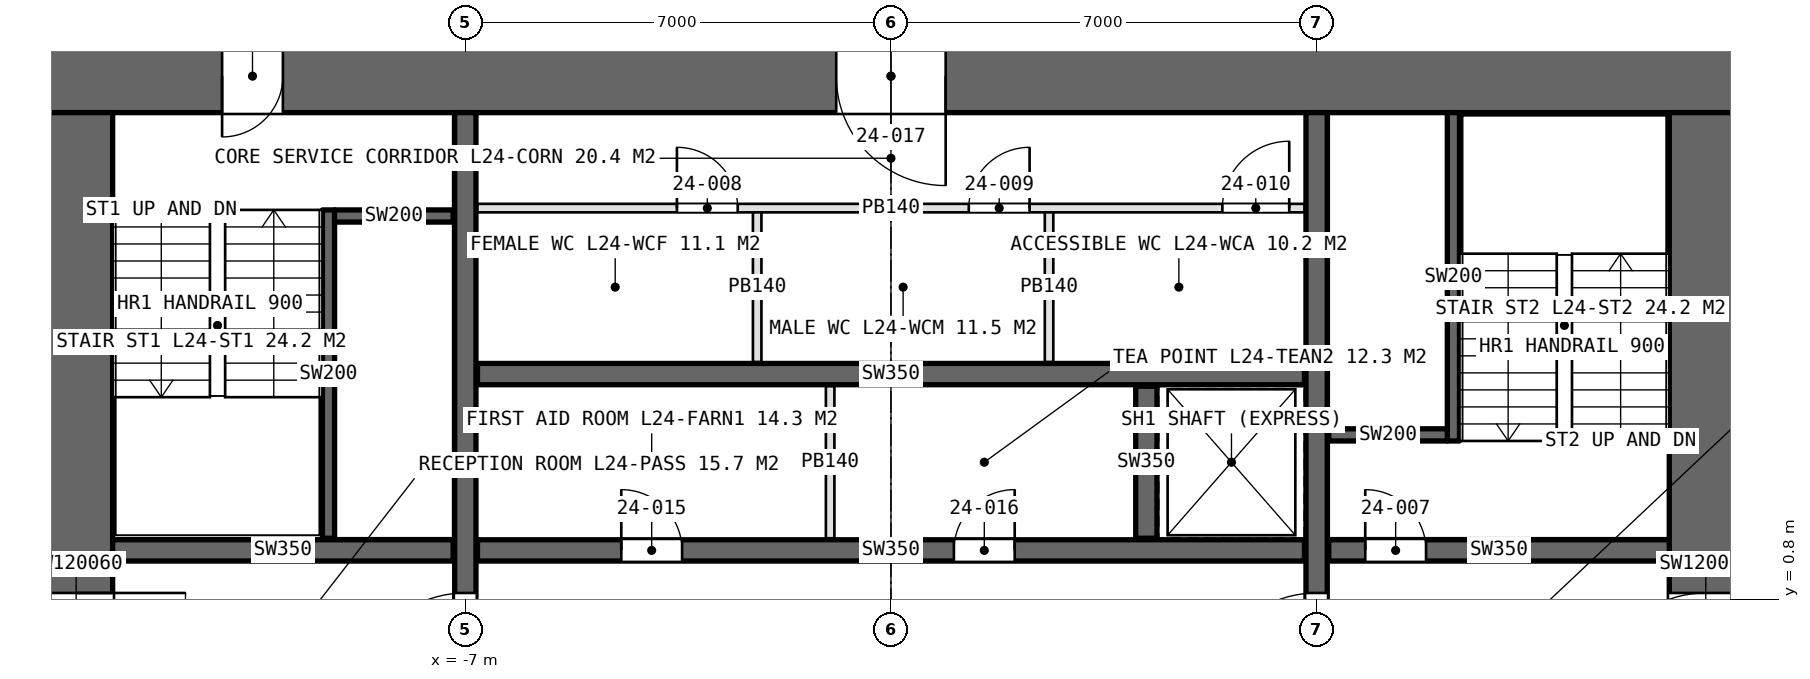
"""IFC4 building model, lengths in metres.
Left out: names, types, materials, properties, quantities, classifications, styles, units other than length and angle.
Written with IfcOpenShell. Run it as: python <this file> out.ifc"""

import sys

from ifc_helpers import new_model, si_unit, direction, frame, frame_2d, origin, place, context, subcontext, project, spatial, rectangle, extrude, element, fill, save


model = new_model("IFC4")
c1 = context("Model", 3, precision=1e-05, world=origin(), true_north=direction((0.0, 1.0)))
c2 = subcontext(c1, "Body", "Model", "MODEL_VIEW")
j1 = project(units=[si_unit("LENGTHUNIT", "METRE"), si_unit("PLANEANGLEUNIT", "RADIAN")], contexts=[c1])
p1 = place(None, origin())
s1 = spatial("IfcSite", under=j1, at=p1, CompositionType="ELEMENT")
p2 = place(p1, origin())
s2 = spatial("IfcBuilding", under=s1, at=p2, CompositionType="ELEMENT")
p3 = place(p2, frame((0.0, 0.0, 117.6)))
s3 = spatial("IfcBuildingStorey", under=s2, at=p3, CompositionType="ELEMENT", Elevation=117.6)
p4 = place(p3, frame((14.0, 9.4, 0.0), z_axis=(0.0, 0.0, 1.0), x_axis=(-1.0, 0.0, 0.0)))
e1 = element("IfcWall", 1, at=p4, inside=s3, PredefinedType="SHEAR", context=c2, shape_type="SweptSolid", body=[
    extrude(rectangle(XDim=28.0, YDim=1.2, at=frame_2d((14.0, 0.0))), origin(), (0.0, 0.0, 1.0), 4.2),
])
p5 = place(p4, frame((24.0, 0.0, 0.0)))
e2 = element("IfcOpeningElement", 2, at=p5, cuts=e1, PredefinedType="OPENING", context=c2, shape_type="SweptSolid", body=[
    extrude(rectangle(XDim=1.0, YDim=2.4, at=frame_2d((0.5, 1.2))), frame((0.0, 0.61, 0.0), z_axis=(0.0, -1.0, 0.0), x_axis=(1.0, 0.0, 0.0)), (0.0, 0.0, 1.0), 1.22),
])
p6 = place(p4, frame((13.1, 0.0, 0.0)))
e3 = element("IfcOpeningElement", 3, at=p6, cuts=e1, PredefinedType="OPENING", context=c2, shape_type="SweptSolid", body=[
    extrude(rectangle(XDim=1.8, YDim=2.4, at=frame_2d((0.9, 1.2))), frame((0.0, 0.61, 0.0), z_axis=(0.0, -1.0, 0.0), x_axis=(1.0, 0.0, 0.0)), (0.0, 0.0, 1.0), 1.22),
])
p7 = place(p3, frame((-13.4, 8.8, 0.0), z_axis=(0.0, 0.0, 1.0), x_axis=(0.0, -1.0, 0.0)))
e4 = element("IfcWall", 4, at=p7, inside=s3, PredefinedType="SHEAR", context=c2, shape_type="SweptSolid", body=[
    extrude(rectangle(XDim=17.6, YDim=1.2, at=frame_2d((8.8, 0.0))), origin(), (0.0, 0.0, 1.0), 4.2),
])
p8 = place(p7, frame((7.9, 0.0, 0.0)))
e5 = element("IfcOpeningElement", 5, at=p8, cuts=e4, PredefinedType="OPENING", context=c2, shape_type="SweptSolid", body=[
    extrude(rectangle(XDim=1.8, YDim=2.4, at=frame_2d((0.9, 1.2))), frame((0.0, 0.61, 0.0), z_axis=(0.0, -1.0, 0.0), x_axis=(1.0, 0.0, 0.0)), (0.0, 0.0, 1.0), 1.22),
])
p9 = place(p7, frame((16.5, 0.0, 0.0)))
e6 = element("IfcOpeningElement", 6, at=p9, cuts=e4, PredefinedType="OPENING", context=c2, shape_type="SweptSolid", body=[
    extrude(rectangle(XDim=1.0, YDim=2.4, at=frame_2d((0.5, 1.2))), frame((0.0, 0.61, 0.0), z_axis=(0.0, -1.0, 0.0), x_axis=(1.0, 0.0, 0.0)), (0.0, 0.0, 1.0), 1.22),
])
p10 = place(p3, frame((13.4, -8.8, 0.0), z_axis=(0.0, 0.0, 1.0), x_axis=(0.0, 1.0, 0.0)))
e7 = element("IfcWall", 7, at=p10, inside=s3, PredefinedType="SHEAR", context=c2, shape_type="SweptSolid", body=[
    extrude(rectangle(XDim=17.6, YDim=1.2, at=frame_2d((8.8, 0.0))), origin(), (0.0, 0.0, 1.0), 4.2),
])
p11 = place(p10, frame((7.9, 0.0, 0.0)))
e8 = element("IfcOpeningElement", 8, at=p11, cuts=e7, PredefinedType="OPENING", context=c2, shape_type="SweptSolid", body=[
    extrude(rectangle(XDim=1.8, YDim=2.4, at=frame_2d((0.9, 1.2))), frame((0.0, 0.61, 0.0), z_axis=(0.0, -1.0, 0.0), x_axis=(1.0, 0.0, 0.0)), (0.0, 0.0, 1.0), 1.22),
])
p12 = place(p3, frame((-7.0, -8.8, 0.0), z_axis=(0.0, 0.0, 1.0), x_axis=(0.0, 1.0, 0.0)))
e9 = element("IfcWall", 9, at=p12, inside=s3, PredefinedType="SHEAR", context=c2, shape_type="SweptSolid", body=[
    extrude(rectangle(XDim=17.6, YDim=0.35, at=frame_2d((8.8, 0.0))), origin(), (0.0, 0.0, 1.0), 4.2),
])
p13 = place(p12, frame((7.9, 0.0, 0.0)))
e10 = element("IfcOpeningElement", 10, at=p13, cuts=e9, PredefinedType="OPENING", context=c2, shape_type="SweptSolid", body=[
    extrude(rectangle(XDim=1.8, YDim=2.4, at=frame_2d((0.9, 1.2))), frame((0.0, 0.185, 0.0), z_axis=(0.0, -1.0, 0.0), x_axis=(1.0, 0.0, 0.0)), (0.0, 0.0, 1.0), 0.37),
])
p14 = place(p3, frame((7.0, -8.8, 0.0), z_axis=(0.0, 0.0, 1.0), x_axis=(0.0, 1.0, 0.0)))
e11 = element("IfcWall", 11, at=p14, inside=s3, PredefinedType="SHEAR", context=c2, shape_type="SweptSolid", body=[
    extrude(rectangle(XDim=17.6, YDim=0.35, at=frame_2d((8.8, 0.0))), origin(), (0.0, 0.0, 1.0), 4.2),
])
p15 = place(p14, frame((7.9, 0.0, 0.0)))
e12 = element("IfcOpeningElement", 12, at=p15, cuts=e11, PredefinedType="OPENING", context=c2, shape_type="SweptSolid", body=[
    extrude(rectangle(XDim=1.8, YDim=2.4, at=frame_2d((0.9, 1.2))), frame((0.0, 0.185, 0.0), z_axis=(0.0, -1.0, 0.0), x_axis=(1.0, 0.0, 0.0)), (0.0, 0.0, 1.0), 0.37),
])
p16 = place(p3, frame((-6.8, 1.6, 0.0), z_axis=(0.0, 0.0, 1.0), x_axis=(1.0, 0.0, 0.0)))
e13 = element("IfcWall", 13, at=p16, inside=s3, PredefinedType="SHEAR", context=c2, shape_type="SweptSolid", body=[
    extrude(rectangle(XDim=13.6, YDim=0.35, at=frame_2d((6.8, 0.0))), origin(), (0.0, 0.0, 1.0), 4.2),
])
p17 = place(p16, frame((2.365, 0.0, 0.0)))
e14 = element("IfcOpeningElement", 14, at=p17, cuts=e13, PredefinedType="OPENING", context=c2, shape_type="SweptSolid", body=[
    extrude(rectangle(XDim=1.0, YDim=2.4, at=frame_2d((0.5, 1.2))), frame((0.0, 0.185, 0.0), z_axis=(0.0, -1.0, 0.0), x_axis=(1.0, 0.0, 0.0)), (0.0, 0.0, 1.0), 0.37),
])
p18 = place(p16, frame((7.835, 0.0, 0.0)))
e15 = element("IfcOpeningElement", 15, at=p18, cuts=e13, PredefinedType="OPENING", context=c2, shape_type="SweptSolid", body=[
    extrude(rectangle(XDim=1.0, YDim=2.4, at=frame_2d((0.5, 1.2))), frame((0.0, 0.185, 0.0), z_axis=(0.0, -1.0, 0.0), x_axis=(1.0, 0.0, 0.0)), (0.0, 0.0, 1.0), 0.37),
])
p19 = place(p3, frame((-6.8, 4.5, 0.0), z_axis=(0.0, 0.0, 1.0), x_axis=(1.0, 0.0, 0.0)))
e16 = element("IfcWall", 16, at=p19, inside=s3, PredefinedType="SHEAR", context=c2, shape_type="SweptSolid", body=[
    extrude(rectangle(XDim=13.6, YDim=0.35, at=frame_2d((6.8, 0.0))), origin(), (0.0, 0.0, 1.0), 4.2),
])
p20 = place(p3, frame((-12.8, 1.6, 0.0), z_axis=(0.0, 0.0, 1.0), x_axis=(1.0, 0.0, 0.0)))
e17 = element("IfcWall", 17, at=p20, inside=s3, PredefinedType="SHEAR", context=c2, shape_type="SweptSolid", body=[
    extrude(rectangle(XDim=5.6, YDim=0.35, at=frame_2d((2.8, 0.0))), origin(), (0.0, 0.0, 1.0), 4.2),
])
p21 = place(p3, frame((7.2, 1.6, 0.0), z_axis=(0.0, 0.0, 1.0), x_axis=(1.0, 0.0, 0.0)))
e18 = element("IfcWall", 18, at=p21, inside=s3, PredefinedType="SHEAR", context=c2, shape_type="SweptSolid", body=[
    extrude(rectangle(XDim=5.6, YDim=0.35, at=frame_2d((2.8, 0.0))), origin(), (0.0, 0.0, 1.0), 4.2),
])
p22 = place(p21, frame((0.6, 0.0, 0.0)))
e19 = element("IfcOpeningElement", 19, at=p22, cuts=e18, PredefinedType="OPENING", context=c2, shape_type="SweptSolid", body=[
    extrude(rectangle(XDim=1.0, YDim=2.4, at=frame_2d((0.5, 1.2))), frame((0.0, 0.185, 0.0), z_axis=(0.0, -1.0, 0.0), x_axis=(1.0, 0.0, 0.0)), (0.0, 0.0, 1.0), 0.37),
])
p23 = place(p3, frame((4.2, 1.8, 0.0), z_axis=(0.0, 0.0, 1.0), x_axis=(0.0, 1.0, 0.0)))
e20 = element("IfcWall", 20, at=p23, inside=s3, PredefinedType="SHEAR", context=c2, shape_type="SweptSolid", body=[
    extrude(rectangle(XDim=2.5, YDim=0.35, at=frame_2d((1.25, 0.0))), origin(), (0.0, 0.0, 1.0), 4.2),
])
p24 = place(p3, frame((-6.8, 7.23, 0.0), z_axis=(0.0, 0.0, 1.0), x_axis=(1.0, 0.0, 0.0)))
e21 = element("IfcWall", 21, at=p24, inside=s3, PredefinedType="PARTITIONING", context=c2, shape_type="SweptSolid", body=[
    extrude(rectangle(XDim=13.6, YDim=0.14, at=frame_2d((6.8, 0.0))), origin(), (0.0, 0.0, 1.0), 3.95),
])
p25 = place(p24, frame((3.28, 0.0, 0.0)))
e22 = element("IfcOpeningElement", 22, at=p25, cuts=e21, PredefinedType="OPENING", context=c2, shape_type="SweptSolid", body=[
    extrude(rectangle(XDim=1.0, YDim=2.4, at=frame_2d((0.5, 1.2))), frame((0.0, 0.08, 0.0), z_axis=(0.0, -1.0, 0.0), x_axis=(1.0, 0.0, 0.0)), (0.0, 0.0, 1.0), 0.16),
])
p26 = place(p24, frame((8.08, 0.0, 0.0)))
e23 = element("IfcOpeningElement", 23, at=p26, cuts=e21, PredefinedType="OPENING", context=c2, shape_type="SweptSolid", body=[
    extrude(rectangle(XDim=1.0, YDim=2.4, at=frame_2d((0.5, 1.2))), frame((0.0, 0.08, 0.0), z_axis=(0.0, -1.0, 0.0), x_axis=(1.0, 0.0, 0.0)), (0.0, 0.0, 1.0), 0.16),
])
p27 = place(p24, frame((12.25, 0.0, 0.0)))
e24 = element("IfcOpeningElement", 24, at=p27, cuts=e21, PredefinedType="OPENING", context=c2, shape_type="SweptSolid", body=[
    extrude(rectangle(XDim=1.1, YDim=2.4, at=frame_2d((0.55, 1.2))), frame((0.0, 0.08, 0.0), z_axis=(0.0, -1.0, 0.0), x_axis=(1.0, 0.0, 0.0)), (0.0, 0.0, 1.0), 0.16),
])
for number, where, z_axis, x_axis in (
    (25, (-2.2, 4.7, 0.0), (0.0, 0.0, 1.0), (0.0, 1.0, 0.0)),
    (26, (2.6, 4.7, 0.0), (0.0, 0.0, 1.0), (0.0, 1.0, 0.0)),
):
    element("IfcWall", number, at=place(p3, frame(where, z_axis=z_axis, x_axis=x_axis)), inside=s3, PredefinedType="PARTITIONING", context=c2, shape_type="SweptSolid", body=[
        extrude(rectangle(XDim=2.46, YDim=0.14, at=frame_2d((1.23, 0.0))), origin(), (0.0, 0.0, 1.0), 3.95),
    ])
p28 = place(p3, frame((-1.0, 1.8, 0.0), z_axis=(0.0, 0.0, 1.0), x_axis=(0.0, 1.0, 0.0)))
e27 = element("IfcWall", 27, at=p28, inside=s3, PredefinedType="PARTITIONING", context=c2, shape_type="SweptSolid", body=[
    extrude(rectangle(XDim=2.5, YDim=0.14, at=frame_2d((1.25, 0.0))), origin(), (0.0, 0.0, 1.0), 3.95),
])
p29 = place(p3, frame((-9.25, 7.2, 0.0), z_axis=(0.0, 0.0, 1.0), x_axis=(0.0, -1.0, 0.0)))
e28 = element("IfcWall", 28, at=p29, inside=s3, PredefinedType="SOLIDWALL", context=c2, shape_type="SweptSolid", body=[
    extrude(rectangle(XDim=5.4, YDim=0.2, at=frame_2d((2.7, 0.0))), origin(), (0.0, 0.0, 1.0), 4.2),
])
p30 = place(p3, frame((-9.15, 7.1, 0.0), z_axis=(0.0, 0.0, 1.0), x_axis=(1.0, 0.0, 0.0)))
e29 = element("IfcWall", 29, at=p30, inside=s3, PredefinedType="SOLIDWALL", context=c2, shape_type="SweptSolid", body=[
    extrude(rectangle(XDim=1.95, YDim=0.2, at=frame_2d((0.975, 0.0))), origin(), (0.0, 0.0, 1.0), 4.2),
])
p31 = place(p3, frame((9.25, 3.4, 0.0), z_axis=(0.0, 0.0, 1.0), x_axis=(0.0, 1.0, 0.0)))
e30 = element("IfcWall", 30, at=p31, inside=s3, PredefinedType="SOLIDWALL", context=c2, shape_type="SweptSolid", body=[
    extrude(rectangle(XDim=5.4, YDim=0.2, at=frame_2d((2.7, 0.0))), origin(), (0.0, 0.0, 1.0), 4.2),
])
p32 = place(p3, frame((9.15, 3.5, 0.0), z_axis=(0.0, 0.0, 1.0), x_axis=(-1.0, 0.0, 0.0)))
e31 = element("IfcWall", 31, at=p32, inside=s3, PredefinedType="SOLIDWALL", context=c2, shape_type="SweptSolid", body=[
    extrude(rectangle(XDim=1.95, YDim=0.2, at=frame_2d((0.975, 0.0))), origin(), (0.0, 0.0, 1.0), 4.2),
])
p33 = place(p8, origin())
e32 = element("IfcDoor", 32, at=p33, inside=s3, OperationType="DOUBLE_DOOR_SINGLE_SWING", PredefinedType="DOOR", context=c2, shape_type="SweptSolid", body=[
    extrude(rectangle(XDim=1.8, YDim=2.4, at=frame_2d((0.9, 1.2))), frame((0.0, 0.025, 0.0), z_axis=(0.0, -1.0, 0.0), x_axis=(1.0, 0.0, 0.0)), (0.0, 0.0, 1.0), 0.05),
])
fill(e5, e32)
p34 = place(p11, origin())
e33 = element("IfcDoor", 33, at=p34, inside=s3, OperationType="DOUBLE_DOOR_SINGLE_SWING", PredefinedType="DOOR", context=c2, shape_type="SweptSolid", body=[
    extrude(rectangle(XDim=1.8, YDim=2.4, at=frame_2d((0.9, 1.2))), frame((0.0, 0.025, 0.0), z_axis=(0.0, -1.0, 0.0), x_axis=(1.0, 0.0, 0.0)), (0.0, 0.0, 1.0), 0.05),
])
fill(e8, e33)
p35 = place(p13, origin())
e34 = element("IfcDoor", 34, at=p35, inside=s3, OperationType="DOUBLE_DOOR_SINGLE_SWING", PredefinedType="DOOR", context=c2, shape_type="SweptSolid", body=[
    extrude(rectangle(XDim=1.8, YDim=2.4, at=frame_2d((0.9, 1.2))), frame((0.0, 0.025, 0.0), z_axis=(0.0, -1.0, 0.0), x_axis=(1.0, 0.0, 0.0)), (0.0, 0.0, 1.0), 0.05),
])
fill(e10, e34)
p36 = place(p15, origin())
e35 = element("IfcDoor", 35, at=p36, inside=s3, OperationType="DOUBLE_DOOR_SINGLE_SWING", PredefinedType="DOOR", context=c2, shape_type="SweptSolid", body=[
    extrude(rectangle(XDim=1.8, YDim=2.4, at=frame_2d((0.9, 1.2))), frame((0.0, 0.025, 0.0), z_axis=(0.0, -1.0, 0.0), x_axis=(1.0, 0.0, 0.0)), (0.0, 0.0, 1.0), 0.05),
])
fill(e12, e35)
p37 = place(p5, origin())
e36 = element("IfcDoor", 36, at=p37, inside=s3, OperationType="SINGLE_SWING_RIGHT", PredefinedType="DOOR", context=c2, shape_type="SweptSolid", body=[
    extrude(rectangle(XDim=1.0, YDim=2.4, at=frame_2d((0.5, 1.2))), frame((0.0, 0.025, 0.0), z_axis=(0.0, -1.0, 0.0), x_axis=(1.0, 0.0, 0.0)), (0.0, 0.0, 1.0), 0.05),
])
fill(e2, e36)
p38 = place(p22, origin())
e37 = element("IfcDoor", 37, at=p38, inside=s3, OperationType="SINGLE_SWING_LEFT", PredefinedType="DOOR", context=c2, shape_type="SweptSolid", body=[
    extrude(rectangle(XDim=1.0, YDim=2.4, at=frame_2d((0.5, 1.2))), frame((0.0, 0.025, 0.0), z_axis=(0.0, -1.0, 0.0), x_axis=(1.0, 0.0, 0.0)), (0.0, 0.0, 1.0), 0.05),
])
fill(e19, e37)
p39 = place(p25, origin())
e38 = element("IfcDoor", 38, at=p39, inside=s3, OperationType="SINGLE_SWING_LEFT", PredefinedType="DOOR", context=c2, shape_type="SweptSolid", body=[
    extrude(rectangle(XDim=1.0, YDim=2.4, at=frame_2d((0.5, 1.2))), frame((0.0, 0.025, 0.0), z_axis=(0.0, -1.0, 0.0), x_axis=(1.0, 0.0, 0.0)), (0.0, 0.0, 1.0), 0.05),
])
fill(e22, e38)
p40 = place(p26, origin())
e39 = element("IfcDoor", 39, at=p40, inside=s3, OperationType="SINGLE_SWING_RIGHT", PredefinedType="DOOR", context=c2, shape_type="SweptSolid", body=[
    extrude(rectangle(XDim=1.0, YDim=2.4, at=frame_2d((0.5, 1.2))), frame((0.0, 0.025, 0.0), z_axis=(0.0, -1.0, 0.0), x_axis=(1.0, 0.0, 0.0)), (0.0, 0.0, 1.0), 0.05),
])
fill(e23, e39)
p41 = place(p27, origin())
e40 = element("IfcDoor", 40, at=p41, inside=s3, OperationType="SINGLE_SWING_RIGHT", PredefinedType="DOOR", context=c2, shape_type="SweptSolid", body=[
    extrude(rectangle(XDim=1.1, YDim=2.4, at=frame_2d((0.55, 1.2))), frame((0.0, 0.025, 0.0), z_axis=(0.0, -1.0, 0.0), x_axis=(1.0, 0.0, 0.0)), (0.0, 0.0, 1.0), 0.05),
])
fill(e24, e40)
p42 = place(p17, origin())
e41 = element("IfcDoor", 41, at=p42, inside=s3, OperationType="SINGLE_SWING_LEFT", PredefinedType="DOOR", context=c2, shape_type="SweptSolid", body=[
    extrude(rectangle(XDim=1.0, YDim=2.4, at=frame_2d((0.5, 1.2))), frame((0.0, 0.025, 0.0), z_axis=(0.0, -1.0, 0.0), x_axis=(1.0, 0.0, 0.0)), (0.0, 0.0, 1.0), 0.05),
])
fill(e14, e41)
p43 = place(p18, origin())
e42 = element("IfcDoor", 42, at=p43, inside=s3, OperationType="SINGLE_SWING_RIGHT", PredefinedType="DOOR", context=c2, shape_type="SweptSolid", body=[
    extrude(rectangle(XDim=1.0, YDim=2.4, at=frame_2d((0.5, 1.2))), frame((0.0, 0.025, 0.0), z_axis=(0.0, -1.0, 0.0), x_axis=(1.0, 0.0, 0.0)), (0.0, 0.0, 1.0), 0.05),
])
fill(e15, e42)
p44 = place(p6, origin())
e43 = element("IfcDoor", 43, at=p44, inside=s3, OperationType="DOUBLE_DOOR_SINGLE_SWING", PredefinedType="DOOR", context=c2, shape_type="SweptSolid", body=[
    extrude(rectangle(XDim=1.8, YDim=2.4, at=frame_2d((0.9, 1.2))), frame((0.0, 0.025, 0.0), z_axis=(0.0, -1.0, 0.0), x_axis=(1.0, 0.0, 0.0)), (0.0, 0.0, 1.0), 0.05),
])
fill(e3, e43)
save(model, sys.argv[1])
